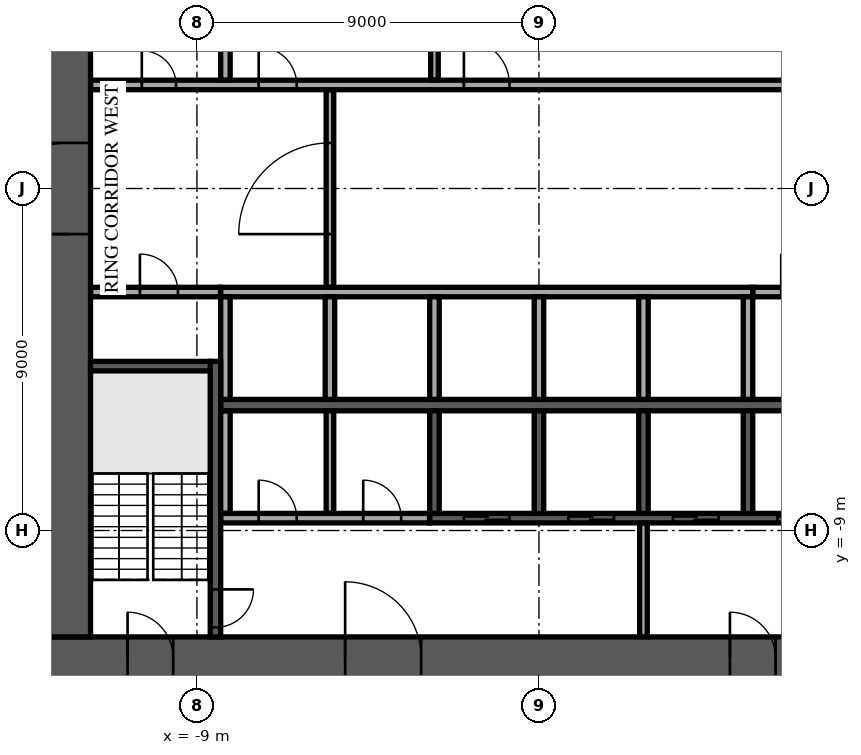
"""IFC4 building model, lengths in metres.
Left out: names, types, materials, properties, quantities, classifications, styles, units other than length and angle.
Written with IfcOpenShell. Run it as: python <this file> out.ifc"""

import sys

from ifc_helpers import new_model, si_unit, direction, frame, frame_2d, origin, place, context, subcontext, project, spatial, rectangle, extrude, element, fill, save


model = new_model("IFC4")
c1 = context("Model", 3, precision=1e-05, world=origin(), true_north=direction((0.0, 1.0)))
c2 = subcontext(c1, "Body", "Model", "MODEL_VIEW")
j1 = project(units=[si_unit("LENGTHUNIT", "METRE"), si_unit("PLANEANGLEUNIT", "RADIAN")], contexts=[c1])
p1 = place(None, origin())
s1 = spatial("IfcSite", under=j1, at=p1, CompositionType="ELEMENT")
p2 = place(p1, origin())
s2 = spatial("IfcBuilding", under=s1, at=p2, CompositionType="ELEMENT")
p3 = place(p2, frame((0.0, 0.0, 82.1)))
s3 = spatial("IfcBuildingStorey", under=s2, at=p3, CompositionType="ELEMENT", Elevation=82.1)
p4 = place(p3, frame((-12.9, -12.35, 0.0), z_axis=(0.0, 0.0, 1.0), x_axis=(1.0, 0.0, 0.0)))
e1 = element("IfcWall", 1, at=p4, inside=s3, PredefinedType="SHEAR", context=c2, shape_type="SweptSolid", body=[
    extrude(rectangle(XDim=25.8, YDim=1.1, at=frame_2d((12.9, 0.0))), origin(), (0.0, 0.0, 1.0), 3.58),
])
p5 = place(p4, frame((7.8, 0.0, 0.0)))
e2 = element("IfcOpeningElement", 2, at=p5, cuts=e1, PredefinedType="OPENING", context=c2, shape_type="SweptSolid", body=[
    extrude(rectangle(XDim=2.0, YDim=2.1, at=frame_2d((1.0, 1.05))), frame((0.0, 0.56, 0.0), z_axis=(0.0, -1.0, 0.0), x_axis=(1.0, 0.0, 0.0)), (0.0, 0.0, 1.0), 1.12),
])
p6 = place(p4, frame((17.925, 0.0, 0.0)))
e3 = element("IfcOpeningElement", 3, at=p6, cuts=e1, PredefinedType="OPENING", context=c2, shape_type="SweptSolid", body=[
    extrude(rectangle(XDim=1.2, YDim=2.1, at=frame_2d((0.6, 1.05))), frame((0.0, 0.56, 0.0), z_axis=(0.0, -1.0, 0.0), x_axis=(1.0, 0.0, 0.0)), (0.0, 0.0, 1.0), 1.12),
])
p7 = place(p4, frame((2.075, 0.0, 0.0)))
e4 = element("IfcOpeningElement", 4, at=p7, cuts=e1, PredefinedType="OPENING", context=c2, shape_type="SweptSolid", body=[
    extrude(rectangle(XDim=1.2, YDim=2.1, at=frame_2d((0.6, 1.05))), frame((0.0, 0.56, 0.0), z_axis=(0.0, -1.0, 0.0), x_axis=(1.0, 0.0, 0.0)), (0.0, 0.0, 1.0), 1.12),
])
p8 = place(p4, frame((22.525, 0.0, 0.0)))
e5 = element("IfcOpeningElement", 5, at=p8, cuts=e1, PredefinedType="OPENING", context=c2, shape_type="SweptSolid", body=[
    extrude(rectangle(XDim=1.2, YDim=2.1, at=frame_2d((0.6, 1.05))), frame((0.0, 0.56, 0.0), z_axis=(0.0, -1.0, 0.0), x_axis=(1.0, 0.0, 0.0)), (0.0, 0.0, 1.0), 1.12),
])
p9 = place(p3, frame((-12.35, -11.8, 0.0), z_axis=(0.0, 0.0, 1.0), x_axis=(0.0, 1.0, 0.0)))
e6 = element("IfcWall", 6, at=p9, inside=s3, PredefinedType="SHEAR", context=c2, shape_type="SweptSolid", body=[
    extrude(rectangle(XDim=23.6, YDim=1.1, at=frame_2d((11.8, 0.0))), origin(), (0.0, 0.0, 1.0), 3.58),
])
p10 = place(p9, frame((10.6, 0.0, 0.0)))
e7 = element("IfcOpeningElement", 7, at=p10, cuts=e6, PredefinedType="OPENING", context=c2, shape_type="SweptSolid", body=[
    extrude(rectangle(XDim=2.4, YDim=2.4, at=frame_2d((1.2, 1.2))), frame((0.0, 0.56, 0.0), z_axis=(0.0, -1.0, 0.0), x_axis=(1.0, 0.0, 0.0)), (0.0, 0.0, 1.0), 1.12),
])
p11 = place(p3, frame((-8.375, -5.7, 0.0), z_axis=(0.0, 0.0, 1.0), x_axis=(1.0, 0.0, 0.0)))
e8 = element("IfcWall", 8, at=p11, inside=s3, PredefinedType="SOLIDWALL", context=c2, shape_type="SweptSolid", body=[
    extrude(rectangle(XDim=16.75, YDim=0.3, at=frame_2d((8.375, 0.0))), origin(), (0.0, 0.0, 1.0), 3.58),
])
p12 = place(p3, frame((-8.375, -2.725, 0.0), z_axis=(0.0, 0.0, 1.0), x_axis=(1.0, 0.0, 0.0)))
e9 = element("IfcWall", 9, at=p12, inside=s3, PredefinedType="SOLIDWALL", context=c2, shape_type="SweptSolid", body=[
    extrude(rectangle(XDim=14.0, YDim=0.25, at=frame_2d((7.0, 0.0))), origin(), (0.0, 0.0, 1.0), 3.58),
])
for number, where, z_axis, x_axis in (
    (10, (-8.25, -5.55, 0.0), (0.0, 0.0, 1.0), (0.0, 1.0, 0.0)),
    (11, (-5.5, -5.55, 0.0), (0.0, 0.0, 1.0), (0.0, 1.0, 0.0)),
    (12, (-2.75, -5.55, 0.0), (0.0, 0.0, 1.0), (0.0, 1.0, 0.0)),
    (13, (0.0, -5.55, 0.0), (0.0, 0.0, 1.0), (0.0, 1.0, 0.0)),
    (14, (2.75, -5.55, 0.0), (0.0, 0.0, 1.0), (0.0, 1.0, 0.0)),
    (15, (5.5, -5.55, 0.0), (0.0, 0.0, 1.0), (0.0, 1.0, 0.0)),
):
    element("IfcWall", number, at=place(p3, frame(where, z_axis=z_axis, x_axis=x_axis)), inside=s3, PredefinedType="SOLIDWALL", context=c2, shape_type="SweptSolid", body=[
        extrude(rectangle(XDim=2.7, YDim=0.25, at=frame_2d((1.35, 0.0))), origin(), (0.0, 0.0, 1.0), 3.58),
    ])
p13 = place(p3, frame((-2.875, -8.675, 0.0), z_axis=(0.0, 0.0, 1.0), x_axis=(1.0, 0.0, 0.0)))
e16 = element("IfcWall", 16, at=p13, inside=s3, PredefinedType="SOLIDWALL", context=c2, shape_type="SweptSolid", body=[
    extrude(rectangle(XDim=11.25, YDim=0.25, at=frame_2d((5.625, 0.0))), origin(), (0.0, 0.0, 1.0), 3.58),
])
p14 = place(p13, frame((0.9, 0.0, 0.0)))
e17 = element("IfcOpeningElement", 17, at=p14, cuts=e16, PredefinedType="OPENING", context=c2, shape_type="SweptSolid", body=[
    extrude(rectangle(XDim=1.2, YDim=2.1, at=frame_2d((0.6, 1.05))), frame((0.0, 0.135, 0.0), z_axis=(0.0, -1.0, 0.0), x_axis=(1.0, 0.0, 0.0)), (0.0, 0.0, 1.0), 0.27),
])
p15 = place(p13, frame((3.65, 0.0, 0.0)))
e18 = element("IfcOpeningElement", 18, at=p15, cuts=e16, PredefinedType="OPENING", context=c2, shape_type="SweptSolid", body=[
    extrude(rectangle(XDim=1.2, YDim=2.1, at=frame_2d((0.6, 1.05))), frame((0.0, 0.135, 0.0), z_axis=(0.0, -1.0, 0.0), x_axis=(1.0, 0.0, 0.0)), (0.0, 0.0, 1.0), 0.27),
])
p16 = place(p13, frame((6.4, 0.0, 0.0)))
e19 = element("IfcOpeningElement", 19, at=p16, cuts=e16, PredefinedType="OPENING", context=c2, shape_type="SweptSolid", body=[
    extrude(rectangle(XDim=1.2, YDim=2.1, at=frame_2d((0.6, 1.05))), frame((0.0, 0.135, 0.0), z_axis=(0.0, -1.0, 0.0), x_axis=(1.0, 0.0, 0.0)), (0.0, 0.0, 1.0), 0.27),
])
p17 = place(p13, frame((9.15, 0.0, 0.0)))
e20 = element("IfcOpeningElement", 20, at=p17, cuts=e16, PredefinedType="OPENING", context=c2, shape_type="SweptSolid", body=[
    extrude(rectangle(XDim=1.2, YDim=2.1, at=frame_2d((0.6, 1.05))), frame((0.0, 0.135, 0.0), z_axis=(0.0, -1.0, 0.0), x_axis=(1.0, 0.0, 0.0)), (0.0, 0.0, 1.0), 0.27),
])
for number, where, z_axis, x_axis in (
    (21, (-2.75, -8.55, 0.0), (0.0, 0.0, 1.0), (0.0, 1.0, 0.0)),
    (22, (0.0, -8.55, 0.0), (0.0, 0.0, 1.0), (0.0, 1.0, 0.0)),
    (23, (2.75, -8.55, 0.0), (0.0, 0.0, 1.0), (0.0, 1.0, 0.0)),
    (24, (5.5, -8.55, 0.0), (0.0, 0.0, 1.0), (0.0, 1.0, 0.0)),
):
    element("IfcWall", number, at=place(p3, frame(where, z_axis=z_axis, x_axis=x_axis)), inside=s3, PredefinedType="SOLIDWALL", context=c2, shape_type="SweptSolid", body=[
        extrude(rectangle(XDim=2.7, YDim=0.25, at=frame_2d((1.35, 0.0))), origin(), (0.0, 0.0, 1.0), 3.58),
    ])
p18 = place(p3, frame((-8.512, -4.55, 0.0), z_axis=(0.0, 0.0, 1.0), x_axis=(0.0, -1.0, 0.0)))
e25 = element("IfcWall", 25, at=p18, inside=s3, PredefinedType="SOLIDWALL", context=c2, shape_type="SweptSolid", body=[
    extrude(rectangle(XDim=7.25, YDim=0.275, at=frame_2d((3.625, 0.0))), origin(), (0.0, 0.0, 1.0), 3.58),
])
p19 = place(p18, frame((6.0, 0.0, 0.0)))
e26 = element("IfcOpeningElement", 26, at=p19, cuts=e25, PredefinedType="OPENING", context=c2, shape_type="SweptSolid", body=[
    extrude(rectangle(XDim=1.0, YDim=2.1, at=frame_2d((0.5, 1.05))), frame((0.0, 0.147, 0.0), z_axis=(0.0, -1.0, 0.0), x_axis=(1.0, 0.0, 0.0)), (0.0, 0.0, 1.0), 0.295),
])
p20 = place(p3, frame((-8.65, -4.675, 0.0), z_axis=(0.0, 0.0, 1.0), x_axis=(-1.0, 0.0, 0.0)))
e27 = element("IfcWall", 27, at=p20, inside=s3, PredefinedType="SOLIDWALL", context=c2, shape_type="SweptSolid", body=[
    extrude(rectangle(XDim=3.15, YDim=0.25, at=frame_2d((1.575, 0.0))), origin(), (0.0, 0.0, 1.0), 3.58),
])
p21 = place(p3, frame((2.75, -11.795, 0.0), z_axis=(0.0, 0.0, 1.0), x_axis=(0.0, 1.0, 0.0)))
e28 = element("IfcWall", 28, at=p21, inside=s3, PredefinedType="PARTITIONING", context=c2, shape_type="SweptSolid", body=[
    extrude(rectangle(XDim=2.99, YDim=0.2, at=frame_2d((1.495, 0.0))), origin(), (0.0, 0.0, 1.0), 3.58),
])
p22 = place(p3, frame((-8.37, -8.675, 0.0), z_axis=(0.0, 0.0, 1.0), x_axis=(1.0, 0.0, 0.0)))
e29 = element("IfcWall", 29, at=p22, inside=s3, PredefinedType="PARTITIONING", context=c2, shape_type="SweptSolid", body=[
    extrude(rectangle(XDim=5.49, YDim=0.25, at=frame_2d((2.745, 0.0))), origin(), (0.0, 0.0, 1.0), 3.58),
])
p23 = place(p22, frame((0.995, 0.0, 0.0)))
e30 = element("IfcOpeningElement", 30, at=p23, cuts=e29, PredefinedType="OPENING", context=c2, shape_type="SweptSolid", body=[
    extrude(rectangle(XDim=1.0, YDim=2.1, at=frame_2d((0.5, 1.05))), frame((0.0, 0.135, 0.0), z_axis=(0.0, -1.0, 0.0), x_axis=(1.0, 0.0, 0.0)), (0.0, 0.0, 1.0), 0.27),
])
p24 = place(p22, frame((3.745, 0.0, 0.0)))
e31 = element("IfcOpeningElement", 31, at=p24, cuts=e29, PredefinedType="OPENING", context=c2, shape_type="SweptSolid", body=[
    extrude(rectangle(XDim=1.0, YDim=2.1, at=frame_2d((0.5, 1.05))), frame((0.0, 0.135, 0.0), z_axis=(0.0, -1.0, 0.0), x_axis=(1.0, 0.0, 0.0)), (0.0, 0.0, 1.0), 0.27),
])
p25 = place(p3, frame((-8.25, -8.545, 0.0), z_axis=(0.0, 0.0, 1.0), x_axis=(0.0, 1.0, 0.0)))
e32 = element("IfcWall", 32, at=p25, inside=s3, PredefinedType="PARTITIONING", context=c2, shape_type="SweptSolid", body=[
    extrude(rectangle(XDim=2.69, YDim=0.25, at=frame_2d((1.345, 0.0))), origin(), (0.0, 0.0, 1.0), 3.58),
])
p26 = place(p3, frame((-5.5, -8.545, 0.0), z_axis=(0.0, 0.0, 1.0), x_axis=(0.0, 1.0, 0.0)))
e33 = element("IfcWall", 33, at=p26, inside=s3, PredefinedType="PARTITIONING", context=c2, shape_type="SweptSolid", body=[
    extrude(rectangle(XDim=2.69, YDim=0.2, at=frame_2d((1.345, 0.0))), origin(), (0.0, 0.0, 1.0), 3.58),
])
p27 = place(p3, frame((-11.795, -2.725, 0.0), z_axis=(0.0, 0.0, 1.0), x_axis=(1.0, 0.0, 0.0)))
e34 = element("IfcWall", 34, at=p27, inside=s3, PredefinedType="PARTITIONING", context=c2, shape_type="SweptSolid", body=[
    extrude(rectangle(XDim=3.415, YDim=0.25, at=frame_2d((1.708, 0.0))), origin(), (0.0, 0.0, 1.0), 3.58),
])
p28 = place(p27, frame((1.295, 0.0, 0.0)))
e35 = element("IfcOpeningElement", 35, at=p28, cuts=e34, PredefinedType="OPENING", context=c2, shape_type="SweptSolid", body=[
    extrude(rectangle(XDim=1.0, YDim=2.1, at=frame_2d((0.5, 1.05))), frame((0.0, 0.135, 0.0), z_axis=(0.0, -1.0, 0.0), x_axis=(1.0, 0.0, 0.0)), (0.0, 0.0, 1.0), 0.27),
])
p29 = place(p3, frame((5.63, -2.725, 0.0), z_axis=(0.0, 0.0, 1.0), x_axis=(1.0, 0.0, 0.0)))
e36 = element("IfcWall", 36, at=p29, inside=s3, PredefinedType="PARTITIONING", context=c2, shape_type="SweptSolid", body=[
    extrude(rectangle(XDim=6.165, YDim=0.25, at=frame_2d((3.083, 0.0))), origin(), (0.0, 0.0, 1.0), 3.58),
])
p30 = place(p29, frame((0.745, 0.0, 0.0)))
e37 = element("IfcOpeningElement", 37, at=p30, cuts=e36, PredefinedType="OPENING", context=c2, shape_type="SweptSolid", body=[
    extrude(rectangle(XDim=1.0, YDim=2.1, at=frame_2d((0.5, 1.05))), frame((0.0, 0.135, 0.0), z_axis=(0.0, -1.0, 0.0), x_axis=(1.0, 0.0, 0.0)), (0.0, 0.0, 1.0), 0.27),
])
p31 = place(p29, frame((3.92, 0.0, 0.0)))
e38 = element("IfcOpeningElement", 38, at=p31, cuts=e36, PredefinedType="OPENING", context=c2, shape_type="SweptSolid", body=[
    extrude(rectangle(XDim=0.9, YDim=2.1, at=frame_2d((0.45, 1.05))), frame((0.0, 0.135, 0.0), z_axis=(0.0, -1.0, 0.0), x_axis=(1.0, 0.0, 0.0)), (0.0, 0.0, 1.0), 0.27),
])
p32 = place(p3, frame((-5.5, -2.595, 0.0), z_axis=(0.0, 0.0, 1.0), x_axis=(0.0, 1.0, 0.0)))
e39 = element("IfcWall", 39, at=p32, inside=s3, PredefinedType="PARTITIONING", context=c2, shape_type="SweptSolid", body=[
    extrude(rectangle(XDim=5.19, YDim=0.2, at=frame_2d((2.595, 0.0))), origin(), (0.0, 0.0, 1.0), 3.58),
])
p33 = place(p32, frame((1.395, 0.0, 0.0)))
e40 = element("IfcOpeningElement", 40, at=p33, cuts=e39, PredefinedType="OPENING", context=c2, shape_type="SweptSolid", body=[
    extrude(rectangle(XDim=2.4, YDim=2.4, at=frame_2d((1.2, 1.2))), frame((0.0, 0.11, 0.0), z_axis=(0.0, -1.0, 0.0), x_axis=(1.0, 0.0, 0.0)), (0.0, 0.0, 1.0), 0.22),
])
p34 = place(p3, frame((-11.795, 2.725, 0.0), z_axis=(0.0, 0.0, 1.0), x_axis=(1.0, 0.0, 0.0)))
e41 = element("IfcWall", 41, at=p34, inside=s3, PredefinedType="PARTITIONING", context=c2, shape_type="SweptSolid", body=[
    extrude(rectangle(XDim=23.59, YDim=0.25, at=frame_2d((11.795, 0.0))), origin(), (0.0, 0.0, 1.0), 3.58),
])
p35 = place(p34, frame((21.345, 0.0, 0.0)))
e42 = element("IfcOpeningElement", 42, at=p35, cuts=e41, PredefinedType="OPENING", context=c2, shape_type="SweptSolid", body=[
    extrude(rectangle(XDim=0.9, YDim=2.1, at=frame_2d((0.45, 1.05))), frame((0.0, 0.135, 0.0), z_axis=(0.0, -1.0, 0.0), x_axis=(1.0, 0.0, 0.0)), (0.0, 0.0, 1.0), 0.27),
])
p36 = place(p34, frame((1.345, 0.0, 0.0)))
e43 = element("IfcOpeningElement", 43, at=p36, cuts=e41, PredefinedType="OPENING", context=c2, shape_type="SweptSolid", body=[
    extrude(rectangle(XDim=0.9, YDim=2.1, at=frame_2d((0.45, 1.05))), frame((0.0, 0.135, 0.0), z_axis=(0.0, -1.0, 0.0), x_axis=(1.0, 0.0, 0.0)), (0.0, 0.0, 1.0), 0.27),
])
p37 = place(p34, frame((4.42, 0.0, 0.0)))
e44 = element("IfcOpeningElement", 44, at=p37, cuts=e41, PredefinedType="OPENING", context=c2, shape_type="SweptSolid", body=[
    extrude(rectangle(XDim=1.0, YDim=2.1, at=frame_2d((0.5, 1.05))), frame((0.0, 0.135, 0.0), z_axis=(0.0, -1.0, 0.0), x_axis=(1.0, 0.0, 0.0)), (0.0, 0.0, 1.0), 0.27),
])
p38 = place(p34, frame((9.82, 0.0, 0.0)))
e45 = element("IfcOpeningElement", 45, at=p38, cuts=e41, PredefinedType="OPENING", context=c2, shape_type="SweptSolid", body=[
    extrude(rectangle(XDim=1.2, YDim=2.1, at=frame_2d((0.6, 1.05))), frame((0.0, 0.135, 0.0), z_axis=(0.0, -1.0, 0.0), x_axis=(1.0, 0.0, 0.0)), (0.0, 0.0, 1.0), 0.27),
])
p39 = place(p3, frame((-8.25, 2.855, 0.0), z_axis=(0.0, 0.0, 1.0), x_axis=(0.0, 1.0, 0.0)))
e46 = element("IfcWall", 46, at=p39, inside=s3, PredefinedType="PARTITIONING", context=c2, shape_type="SweptSolid", body=[
    extrude(rectangle(XDim=1.715, YDim=0.25, at=frame_2d((0.857, 0.0))), origin(), (0.0, 0.0, 1.0), 3.58),
])
p40 = place(p3, frame((-2.75, 2.855, 0.0), z_axis=(0.0, 0.0, 1.0), x_axis=(0.0, 1.0, 0.0)))
e47 = element("IfcWall", 47, at=p40, inside=s3, PredefinedType="PARTITIONING", context=c2, shape_type="SweptSolid", body=[
    extrude(rectangle(XDim=2.69, YDim=0.2, at=frame_2d((1.345, 0.0))), origin(), (0.0, 0.0, 1.0), 3.58),
])
p41 = place(p5, origin())
e48 = element("IfcDoor", 48, at=p41, inside=s3, OperationType="SINGLE_SWING_LEFT", PredefinedType="DOOR", context=c2, shape_type="SweptSolid", body=[
    extrude(rectangle(XDim=2.0, YDim=2.1, at=frame_2d((1.0, 1.05))), frame((0.0, 0.025, 0.0), z_axis=(0.0, -1.0, 0.0), x_axis=(1.0, 0.0, 0.0)), (0.0, 0.0, 1.0), 0.05),
])
fill(e2, e48)
p42 = place(p6, origin())
e49 = element("IfcDoor", 49, at=p42, inside=s3, OperationType="SINGLE_SWING_LEFT", PredefinedType="DOOR", context=c2, shape_type="SweptSolid", body=[
    extrude(rectangle(XDim=1.2, YDim=2.1, at=frame_2d((0.6, 1.05))), frame((0.0, 0.025, 0.0), z_axis=(0.0, -1.0, 0.0), x_axis=(1.0, 0.0, 0.0)), (0.0, 0.0, 1.0), 0.05),
])
fill(e3, e49)
p43 = place(p7, origin())
e50 = element("IfcDoor", 50, at=p43, inside=s3, OperationType="SINGLE_SWING_LEFT", PredefinedType="DOOR", context=c2, shape_type="SweptSolid", body=[
    extrude(rectangle(XDim=1.2, YDim=2.1, at=frame_2d((0.6, 1.05))), frame((0.0, 0.025, 0.0), z_axis=(0.0, -1.0, 0.0), x_axis=(1.0, 0.0, 0.0)), (0.0, 0.0, 1.0), 0.05),
])
fill(e4, e50)
p44 = place(p10, origin())
e51 = element("IfcDoor", 51, at=p44, inside=s3, OperationType="SINGLE_SWING_LEFT", PredefinedType="DOOR", context=c2, shape_type="SweptSolid", body=[
    extrude(rectangle(XDim=2.4, YDim=2.4, at=frame_2d((1.2, 1.2))), frame((0.0, 0.025, 0.0), z_axis=(0.0, -1.0, 0.0), x_axis=(1.0, 0.0, 0.0)), (0.0, 0.0, 1.0), 0.05),
])
fill(e7, e51)
p45 = place(p14, origin())
e52 = element("IfcDoor", 52, at=p45, inside=s3, OperationType="DOUBLE_DOOR_SLIDING", PredefinedType="DOOR", context=c2, shape_type="SweptSolid", body=[
    extrude(rectangle(XDim=1.2, YDim=2.1, at=frame_2d((0.6, 1.05))), frame((0.0, 0.025, 0.0), z_axis=(0.0, -1.0, 0.0), x_axis=(1.0, 0.0, 0.0)), (0.0, 0.0, 1.0), 0.05),
])
fill(e17, e52)
p46 = place(p15, origin())
e53 = element("IfcDoor", 53, at=p46, inside=s3, OperationType="DOUBLE_DOOR_SLIDING", PredefinedType="DOOR", context=c2, shape_type="SweptSolid", body=[
    extrude(rectangle(XDim=1.2, YDim=2.1, at=frame_2d((0.6, 1.05))), frame((0.0, 0.025, 0.0), z_axis=(0.0, -1.0, 0.0), x_axis=(1.0, 0.0, 0.0)), (0.0, 0.0, 1.0), 0.05),
])
fill(e18, e53)
p47 = place(p16, origin())
e54 = element("IfcDoor", 54, at=p47, inside=s3, OperationType="DOUBLE_DOOR_SLIDING", PredefinedType="DOOR", context=c2, shape_type="SweptSolid", body=[
    extrude(rectangle(XDim=1.2, YDim=2.1, at=frame_2d((0.6, 1.05))), frame((0.0, 0.025, 0.0), z_axis=(0.0, -1.0, 0.0), x_axis=(1.0, 0.0, 0.0)), (0.0, 0.0, 1.0), 0.05),
])
fill(e19, e54)
p48 = place(p17, origin())
e55 = element("IfcDoor", 55, at=p48, inside=s3, OperationType="DOUBLE_DOOR_SLIDING", PredefinedType="DOOR", context=c2, shape_type="SweptSolid", body=[
    extrude(rectangle(XDim=1.2, YDim=2.1, at=frame_2d((0.6, 1.05))), frame((0.0, 0.025, 0.0), z_axis=(0.0, -1.0, 0.0), x_axis=(1.0, 0.0, 0.0)), (0.0, 0.0, 1.0), 0.05),
])
fill(e20, e55)
p49 = place(p19, origin())
e56 = element("IfcDoor", 56, at=p49, inside=s3, OperationType="SINGLE_SWING_LEFT", PredefinedType="DOOR", context=c2, shape_type="SweptSolid", body=[
    extrude(rectangle(XDim=1.0, YDim=2.1, at=frame_2d((0.5, 1.05))), frame((0.0, 0.025, 0.0), z_axis=(0.0, -1.0, 0.0), x_axis=(1.0, 0.0, 0.0)), (0.0, 0.0, 1.0), 0.05),
])
fill(e26, e56)
p50 = place(p23, origin())
e57 = element("IfcDoor", 57, at=p50, inside=s3, OperationType="SINGLE_SWING_LEFT", PredefinedType="DOOR", context=c2, shape_type="SweptSolid", body=[
    extrude(rectangle(XDim=1.0, YDim=2.1, at=frame_2d((0.5, 1.05))), frame((0.0, 0.025, 0.0), z_axis=(0.0, -1.0, 0.0), x_axis=(1.0, 0.0, 0.0)), (0.0, 0.0, 1.0), 0.05),
])
fill(e30, e57)
p51 = place(p24, origin())
e58 = element("IfcDoor", 58, at=p51, inside=s3, OperationType="SINGLE_SWING_LEFT", PredefinedType="DOOR", context=c2, shape_type="SweptSolid", body=[
    extrude(rectangle(XDim=1.0, YDim=2.1, at=frame_2d((0.5, 1.05))), frame((0.0, 0.025, 0.0), z_axis=(0.0, -1.0, 0.0), x_axis=(1.0, 0.0, 0.0)), (0.0, 0.0, 1.0), 0.05),
])
fill(e31, e58)
p52 = place(p28, origin())
e59 = element("IfcDoor", 59, at=p52, inside=s3, OperationType="SINGLE_SWING_LEFT", PredefinedType="DOOR", context=c2, shape_type="SweptSolid", body=[
    extrude(rectangle(XDim=1.0, YDim=2.1, at=frame_2d((0.5, 1.05))), frame((0.0, 0.025, 0.0), z_axis=(0.0, -1.0, 0.0), x_axis=(1.0, 0.0, 0.0)), (0.0, 0.0, 1.0), 0.05),
])
fill(e35, e59)
p53 = place(p36, origin())
e60 = element("IfcDoor", 60, at=p53, inside=s3, OperationType="SINGLE_SWING_LEFT", PredefinedType="DOOR", context=c2, shape_type="SweptSolid", body=[
    extrude(rectangle(XDim=0.9, YDim=2.1, at=frame_2d((0.45, 1.05))), frame((0.0, 0.025, 0.0), z_axis=(0.0, -1.0, 0.0), x_axis=(1.0, 0.0, 0.0)), (0.0, 0.0, 1.0), 0.05),
])
fill(e43, e60)
p54 = place(p37, origin())
e61 = element("IfcDoor", 61, at=p54, inside=s3, OperationType="SINGLE_SWING_LEFT", PredefinedType="DOOR", context=c2, shape_type="SweptSolid", body=[
    extrude(rectangle(XDim=1.0, YDim=2.1, at=frame_2d((0.5, 1.05))), frame((0.0, 0.025, 0.0), z_axis=(0.0, -1.0, 0.0), x_axis=(1.0, 0.0, 0.0)), (0.0, 0.0, 1.0), 0.05),
])
fill(e44, e61)
p55 = place(p38, origin())
e62 = element("IfcDoor", 62, at=p55, inside=s3, OperationType="SINGLE_SWING_LEFT", PredefinedType="DOOR", context=c2, shape_type="SweptSolid", body=[
    extrude(rectangle(XDim=1.2, YDim=2.1, at=frame_2d((0.6, 1.05))), frame((0.0, 0.025, 0.0), z_axis=(0.0, -1.0, 0.0), x_axis=(1.0, 0.0, 0.0)), (0.0, 0.0, 1.0), 0.05),
])
fill(e45, e62)
p56 = place(p33, origin())
e63 = element("IfcDoor", 63, at=p56, inside=s3, OperationType="SINGLE_SWING_LEFT", PredefinedType="DOOR", context=c2, shape_type="SweptSolid", body=[
    extrude(rectangle(XDim=2.4, YDim=2.4, at=frame_2d((1.2, 1.2))), frame((0.0, 0.025, 0.0), z_axis=(0.0, -1.0, 0.0), x_axis=(1.0, 0.0, 0.0)), (0.0, 0.0, 1.0), 0.05),
])
fill(e40, e63)
save(model, sys.argv[1])
